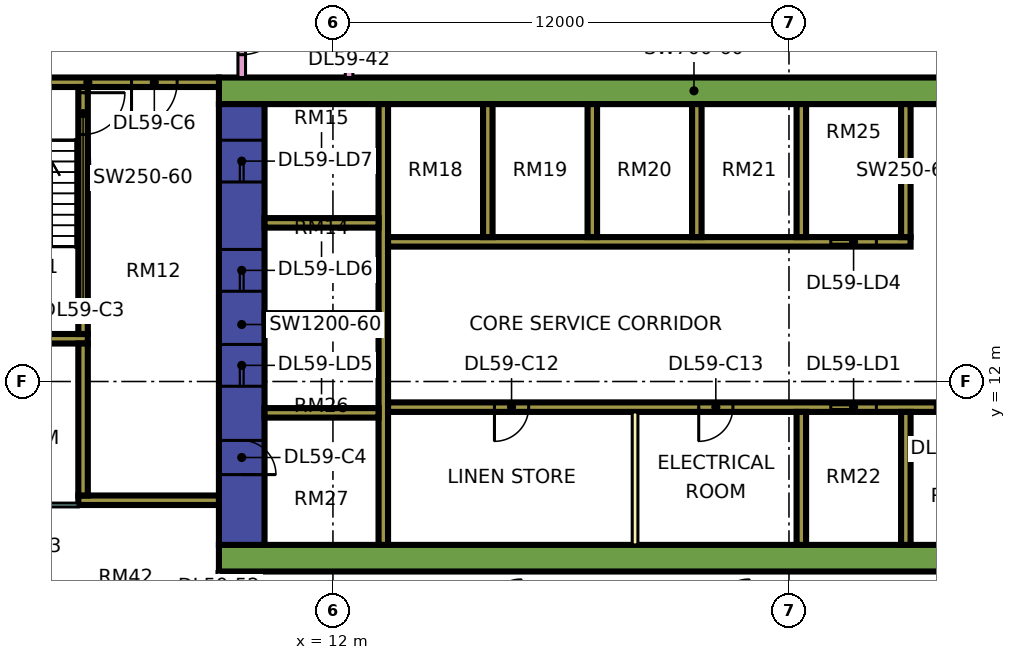
"""IFC4 building model, lengths in metres.
Left out: names, types, materials, properties, quantities, classifications, styles, units other than length and angle.
Written with IfcOpenShell. Run it as: python <this file> out.ifc"""

import sys

from ifc_helpers import new_model, si_unit, direction, frame, frame_2d, origin, place, context, subcontext, project, spatial, rectangle, extrude, element, fill, save


model = new_model("IFC4")
c1 = context("Model", 3, precision=1e-05, world=origin(), true_north=direction((0.0, 1.0)))
c2 = subcontext(c1, "Body", "Model", "MODEL_VIEW")
j1 = project(units=[si_unit("LENGTHUNIT", "METRE"), si_unit("PLANEANGLEUNIT", "RADIAN")], contexts=[c1])
p1 = place(None, origin())
s1 = spatial("IfcSite", under=j1, at=p1, CompositionType="ELEMENT")
p2 = place(p1, origin())
s2 = spatial("IfcBuilding", under=s1, at=p2, CompositionType="ELEMENT")
p3 = place(p2, frame((0.0, 0.0, 249.15)))
s3 = spatial("IfcBuildingStorey", under=s2, at=p3, CompositionType="ELEMENT", Elevation=249.15)
p4 = place(p3, frame((9.0, 7.35, 0.0), z_axis=(0.0, 0.0, 1.0), x_axis=(1.0, 0.0, 0.0)))
e1 = element("IfcWall", 1, at=p4, inside=s3, PredefinedType="SHEAR", context=c2, shape_type="SweptSolid", body=[
    extrude(rectangle(XDim=25.0, YDim=0.7, at=frame_2d((12.5, 0.0))), origin(), (0.0, 0.0, 1.0), 3.75),
])
p5 = place(p3, frame((9.0, 19.65, 0.0), z_axis=(0.0, 0.0, 1.0), x_axis=(1.0, 0.0, 0.0)))
e2 = element("IfcWall", 2, at=p5, inside=s3, PredefinedType="SHEAR", context=c2, shape_type="SweptSolid", body=[
    extrude(rectangle(XDim=25.0, YDim=0.7, at=frame_2d((12.5, 0.0))), origin(), (0.0, 0.0, 1.0), 3.75),
])
p6 = place(p5, frame((19.1, 0.0, 0.0)))
e3 = element("IfcOpeningElement", 3, at=p6, cuts=e2, PredefinedType="OPENING", context=c2, shape_type="SweptSolid", body=[
    extrude(rectangle(XDim=1.8, YDim=2.4, at=frame_2d((0.9, 1.2))), frame((0.0, 0.36, 0.0), z_axis=(0.0, -1.0, 0.0), x_axis=(1.0, 0.0, 0.0)), (0.0, 0.0, 1.0), 0.72),
])
p7 = place(p3, frame((9.6, 7.7, 0.0), z_axis=(0.0, 0.0, 1.0), x_axis=(0.0, 1.0, 0.0)))
e4 = element("IfcWall", 4, at=p7, inside=s3, PredefinedType="SHEAR", context=c2, shape_type="SweptSolid", body=[
    extrude(rectangle(XDim=11.6, YDim=1.2, at=frame_2d((5.8, 0.0))), origin(), (0.0, 0.0, 1.0), 3.75),
])
p8 = place(p7, frame((4.175, 0.0, 0.0)))
e5 = element("IfcOpeningElement", 5, at=p8, cuts=e4, PredefinedType="OPENING", context=c2, shape_type="SweptSolid", body=[
    extrude(rectangle(XDim=1.1, YDim=2.2, at=frame_2d((0.55, 1.1))), frame((0.0, 0.61, 0.0), z_axis=(0.0, -1.0, 0.0), x_axis=(1.0, 0.0, 0.0)), (0.0, 0.0, 1.0), 1.22),
])
p9 = place(p7, frame((6.675, 0.0, 0.0)))
e6 = element("IfcOpeningElement", 6, at=p9, cuts=e4, PredefinedType="OPENING", context=c2, shape_type="SweptSolid", body=[
    extrude(rectangle(XDim=1.1, YDim=2.2, at=frame_2d((0.55, 1.1))), frame((0.0, 0.61, 0.0), z_axis=(0.0, -1.0, 0.0), x_axis=(1.0, 0.0, 0.0)), (0.0, 0.0, 1.0), 1.22),
])
p10 = place(p7, frame((9.55, 0.0, 0.0)))
e7 = element("IfcOpeningElement", 7, at=p10, cuts=e4, PredefinedType="OPENING", context=c2, shape_type="SweptSolid", body=[
    extrude(rectangle(XDim=1.1, YDim=2.2, at=frame_2d((0.55, 1.1))), frame((0.0, 0.61, 0.0), z_axis=(0.0, -1.0, 0.0), x_axis=(1.0, 0.0, 0.0)), (0.0, 0.0, 1.0), 1.22),
])
p11 = place(p7, frame((1.85, 0.0, 0.0)))
e8 = element("IfcOpeningElement", 8, at=p11, cuts=e4, PredefinedType="OPENING", context=c2, shape_type="SweptSolid", body=[
    extrude(rectangle(XDim=0.9, YDim=2.1, at=frame_2d((0.45, 1.05))), frame((0.0, 0.61, 0.0), z_axis=(0.0, -1.0, 0.0), x_axis=(1.0, 0.0, 0.0)), (0.0, 0.0, 1.0), 1.22),
])
p12 = place(p3, frame((13.325, 7.7, 0.0), z_axis=(0.0, 0.0, 1.0), x_axis=(0.0, 1.0, 0.0)))
e9 = element("IfcWall", 9, at=p12, inside=s3, PredefinedType="SHEAR", context=c2, shape_type="SweptSolid", body=[
    extrude(rectangle(XDim=11.6, YDim=0.25, at=frame_2d((5.8, 0.0))), origin(), (0.0, 0.0, 1.0), 3.75),
])
p13 = place(p3, frame((13.45, 11.325, 0.0), z_axis=(0.0, 0.0, 1.0), x_axis=(1.0, 0.0, 0.0)))
e10 = element("IfcWall", 10, at=p13, inside=s3, PredefinedType="SHEAR", context=c2, shape_type="SweptSolid", body=[
    extrude(rectangle(XDim=19.85, YDim=0.25, at=frame_2d((9.925, 0.0))), origin(), (0.0, 0.0, 1.0), 3.75),
])
p14 = place(p13, frame((11.65, 0.0, 0.0)))
e11 = element("IfcOpeningElement", 11, at=p14, cuts=e10, PredefinedType="OPENING", context=c2, shape_type="SweptSolid", body=[
    extrude(rectangle(XDim=1.2, YDim=2.2, at=frame_2d((0.6, 1.1))), frame((0.0, 0.135, 0.0), z_axis=(0.0, -1.0, 0.0), x_axis=(1.0, 0.0, 0.0)), (0.0, 0.0, 1.0), 0.27),
])
p15 = place(p13, frame((14.4, 0.0, 0.0)))
e12 = element("IfcOpeningElement", 12, at=p15, cuts=e10, PredefinedType="OPENING", context=c2, shape_type="SweptSolid", body=[
    extrude(rectangle(XDim=1.2, YDim=2.2, at=frame_2d((0.6, 1.1))), frame((0.0, 0.135, 0.0), z_axis=(0.0, -1.0, 0.0), x_axis=(1.0, 0.0, 0.0)), (0.0, 0.0, 1.0), 0.27),
])
p16 = place(p13, frame((17.15, 0.0, 0.0)))
e13 = element("IfcOpeningElement", 13, at=p16, cuts=e10, PredefinedType="OPENING", context=c2, shape_type="SweptSolid", body=[
    extrude(rectangle(XDim=1.2, YDim=2.2, at=frame_2d((0.6, 1.1))), frame((0.0, 0.135, 0.0), z_axis=(0.0, -1.0, 0.0), x_axis=(1.0, 0.0, 0.0)), (0.0, 0.0, 1.0), 0.27),
])
p17 = place(p13, frame((2.8, 0.0, 0.0)))
e14 = element("IfcOpeningElement", 14, at=p17, cuts=e10, PredefinedType="OPENING", context=c2, shape_type="SweptSolid", body=[
    extrude(rectangle(XDim=0.9, YDim=2.1, at=frame_2d((0.45, 1.05))), frame((0.0, 0.135, 0.0), z_axis=(0.0, -1.0, 0.0), x_axis=(1.0, 0.0, 0.0)), (0.0, 0.0, 1.0), 0.27),
])
p18 = place(p13, frame((8.175, 0.0, 0.0)))
e15 = element("IfcOpeningElement", 15, at=p18, cuts=e10, PredefinedType="OPENING", context=c2, shape_type="SweptSolid", body=[
    extrude(rectangle(XDim=0.9, YDim=2.1, at=frame_2d((0.45, 1.05))), frame((0.0, 0.135, 0.0), z_axis=(0.0, -1.0, 0.0), x_axis=(1.0, 0.0, 0.0)), (0.0, 0.0, 1.0), 0.27),
])
p19 = place(p3, frame((13.45, 15.675, 0.0), z_axis=(0.0, 0.0, 1.0), x_axis=(1.0, 0.0, 0.0)))
e16 = element("IfcWall", 16, at=p19, inside=s3, PredefinedType="SHEAR", context=c2, shape_type="SweptSolid", body=[
    extrude(rectangle(XDim=13.75, YDim=0.25, at=frame_2d((6.875, 0.0))), origin(), (0.0, 0.0, 1.0), 3.75),
])
p20 = place(p19, frame((11.65, 0.0, 0.0)))
e17 = element("IfcOpeningElement", 17, at=p20, cuts=e16, PredefinedType="OPENING", context=c2, shape_type="SweptSolid", body=[
    extrude(rectangle(XDim=1.2, YDim=2.2, at=frame_2d((0.6, 1.1))), frame((0.0, 0.135, 0.0), z_axis=(0.0, -1.0, 0.0), x_axis=(1.0, 0.0, 0.0)), (0.0, 0.0, 1.0), 0.27),
])
for number, where, z_axis, x_axis in (
    (18, (10.2, 11.175, 0.0), (0.0, 0.0, 1.0), (1.0, 0.0, 0.0)),
    (19, (10.2, 13.675, 0.0), (0.0, 0.0, 1.0), (1.0, 0.0, 0.0)),
    (20, (10.2, 16.175, 0.0), (0.0, 0.0, 1.0), (1.0, 0.0, 0.0)),
):
    element("IfcWall", number, at=place(p3, frame(where, z_axis=z_axis, x_axis=x_axis)), inside=s3, PredefinedType="SHEAR", context=c2, shape_type="SweptSolid", body=[
        extrude(rectangle(XDim=3.0, YDim=0.25, at=frame_2d((1.5, 0.0))), origin(), (0.0, 0.0, 1.0), 3.75),
    ])
for number, where, z_axis, x_axis in (
    (21, (24.325, 7.7, 0.0), (0.0, 0.0, 1.0), (0.0, 1.0, 0.0)),
    (22, (27.075, 7.7, 0.0), (0.0, 0.0, 1.0), (0.0, 1.0, 0.0)),
    (23, (16.075, 15.8, 0.0), (0.0, 0.0, 1.0), (0.0, 1.0, 0.0)),
    (24, (18.825, 15.8, 0.0), (0.0, 0.0, 1.0), (0.0, 1.0, 0.0)),
    (25, (21.575, 15.8, 0.0), (0.0, 0.0, 1.0), (0.0, 1.0, 0.0)),
    (26, (24.325, 15.8, 0.0), (0.0, 0.0, 1.0), (0.0, 1.0, 0.0)),
    (27, (27.075, 15.8, 0.0), (0.0, 0.0, 1.0), (0.0, 1.0, 0.0)),
):
    element("IfcWall", number, at=place(p3, frame(where, z_axis=z_axis, x_axis=x_axis)), inside=s3, PredefinedType="SHEAR", context=c2, shape_type="SweptSolid", body=[
        extrude(rectangle(XDim=3.5, YDim=0.25, at=frame_2d((1.75, 0.0))), origin(), (0.0, 0.0, 1.0), 3.75),
    ])
p21 = place(p3, frame((2.1, 19.875, 0.0), z_axis=(0.0, 0.0, 1.0), x_axis=(1.0, 0.0, 0.0)))
e28 = element("IfcWall", 28, at=p21, inside=s3, PredefinedType="SHEAR", context=c2, shape_type="SweptSolid", body=[
    extrude(rectangle(XDim=6.9, YDim=0.25, at=frame_2d((3.45, 0.0))), origin(), (0.0, 0.0, 1.0), 3.75),
])
p22 = place(p21, frame((1.175, 0.0, 0.0)))
e29 = element("IfcOpeningElement", 29, at=p22, cuts=e28, PredefinedType="OPENING", context=c2, shape_type="SweptSolid", body=[
    extrude(rectangle(XDim=1.1, YDim=2.2, at=frame_2d((0.55, 1.1))), frame((0.0, 0.135, 0.0), z_axis=(0.0, -1.0, 0.0), x_axis=(1.0, 0.0, 0.0)), (0.0, 0.0, 1.0), 0.27),
])
p23 = place(p21, frame((4.6, 0.0, 0.0)))
e30 = element("IfcOpeningElement", 30, at=p23, cuts=e28, PredefinedType="OPENING", context=c2, shape_type="SweptSolid", body=[
    extrude(rectangle(XDim=1.2, YDim=2.2, at=frame_2d((0.6, 1.1))), frame((0.0, 0.135, 0.0), z_axis=(0.0, -1.0, 0.0), x_axis=(1.0, 0.0, 0.0)), (0.0, 0.0, 1.0), 0.27),
])
p24 = place(p3, frame((2.1, 13.125, 0.0), z_axis=(0.0, 0.0, 1.0), x_axis=(1.0, 0.0, 0.0)))
e31 = element("IfcWall", 31, at=p24, inside=s3, PredefinedType="SHEAR", context=c2, shape_type="SweptSolid", body=[
    extrude(rectangle(XDim=3.45, YDim=0.25, at=frame_2d((1.725, 0.0))), origin(), (0.0, 0.0, 1.0), 3.75),
])
p25 = place(p3, frame((5.425, 13.25, 0.0), z_axis=(0.0, 0.0, 1.0), x_axis=(0.0, 1.0, 0.0)))
e32 = element("IfcWall", 32, at=p25, inside=s3, PredefinedType="SHEAR", context=c2, shape_type="SweptSolid", body=[
    extrude(rectangle(XDim=6.5, YDim=0.25, at=frame_2d((3.25, 0.0))), origin(), (0.0, 0.0, 1.0), 3.75),
])
p26 = place(p25, frame((5.25, 0.0, 0.0)))
e33 = element("IfcOpeningElement", 33, at=p26, cuts=e32, PredefinedType="OPENING", context=c2, shape_type="SweptSolid", body=[
    extrude(rectangle(XDim=1.1, YDim=2.2, at=frame_2d((0.55, 1.1))), frame((0.0, 0.135, 0.0), z_axis=(0.0, -1.0, 0.0), x_axis=(1.0, 0.0, 0.0)), (0.0, 0.0, 1.0), 0.27),
])
p27 = place(p3, frame((5.3, 8.875, 0.0), z_axis=(0.0, 0.0, 1.0), x_axis=(1.0, 0.0, 0.0)))
e34 = element("IfcWall", 34, at=p27, inside=s3, PredefinedType="SHEAR", context=c2, shape_type="SweptSolid", body=[
    extrude(rectangle(XDim=3.7, YDim=0.25, at=frame_2d((1.85, 0.0))), origin(), (0.0, 0.0, 1.0), 3.75),
])
p28 = place(p3, frame((5.425, 9.0, 0.0), z_axis=(0.0, 0.0, 1.0), x_axis=(0.0, 1.0, 0.0)))
e35 = element("IfcWall", 35, at=p28, inside=s3, PredefinedType="SHEAR", context=c2, shape_type="SweptSolid", body=[
    extrude(rectangle(XDim=4.0, YDim=0.25, at=frame_2d((2.0, 0.0))), origin(), (0.0, 0.0, 1.0), 3.75),
])
p29 = place(p3, frame((-1.447, 12.553, 0.0), z_axis=(0.0, 0.0, 1.0), x_axis=(0.707106781187, -0.707106781187, 0.0)))
e36 = element("IfcWall", 36, at=p29, inside=s3, PredefinedType="SOLIDWALL", context=c2, shape_type="SweptSolid", body=[
    extrude(rectangle(XDim=19.799, YDim=0.15, at=frame_2d((9.899, 0.0))), origin(), (0.0, 0.0, 1.0), 3.35),
])
p30 = place(p29, frame((2.212, 0.0, 0.45)))
e37 = element("IfcOpeningElement", 37, at=p30, cuts=e36, PredefinedType="OPENING", context=c2, shape_type="SweptSolid", body=[
    extrude(rectangle(XDim=3.0, YDim=2.4, at=frame_2d((1.5, 1.2))), frame((0.0, 0.085, 0.0), z_axis=(0.0, -1.0, 0.0), x_axis=(1.0, 0.0, 0.0)), (0.0, 0.0, 1.0), 0.17),
])
p31 = place(p29, frame((10.216, 0.0, 0.45)))
e38 = element("IfcOpeningElement", 38, at=p31, cuts=e36, PredefinedType="OPENING", context=c2, shape_type="SweptSolid", body=[
    extrude(rectangle(XDim=3.0, YDim=2.4, at=frame_2d((1.5, 1.2))), frame((0.0, 0.085, 0.0), z_axis=(0.0, -1.0, 0.0), x_axis=(1.0, 0.0, 0.0)), (0.0, 0.0, 1.0), 0.17),
])
p32 = place(p3, frame((19.95, 7.7, 0.0), z_axis=(0.0, 0.0, 1.0), x_axis=(0.0, 1.0, 0.0)))
e39 = element("IfcWall", 39, at=p32, inside=s3, PredefinedType="PARTITIONING", context=c2, shape_type="SweptSolid", body=[
    extrude(rectangle(XDim=3.5, YDim=0.15, at=frame_2d((1.75, 0.0))), origin(), (0.0, 0.0, 1.0), 3.35),
])
p33 = place(p3, frame((2.461, 8.75, 0.0), z_axis=(0.0, 0.0, 1.0), x_axis=(1.0, 0.0, 0.0)))
e40 = element("IfcWall", 40, at=p33, inside=s3, PredefinedType="PARTITIONING", context=c2, shape_type="SweptSolid", body=[
    extrude(rectangle(XDim=2.839, YDim=0.1, at=frame_2d((1.419, 0.0))), origin(), (0.0, 0.0, 1.0), 3.35),
])
p34 = place(p33, frame((0.889, 0.0, 0.0)))
e41 = element("IfcOpeningElement", 41, at=p34, cuts=e40, PredefinedType="OPENING", context=c2, shape_type="SweptSolid", body=[
    extrude(rectangle(XDim=0.9, YDim=2.1, at=frame_2d((0.45, 1.05))), frame((0.0, 0.06, 0.0), z_axis=(0.0, -1.0, 0.0), x_axis=(1.0, 0.0, 0.0)), (0.0, 0.0, 1.0), 0.12),
])
p35 = place(p3, frame((9.0, 3.95, 0.0), z_axis=(0.0, 0.0, 1.0), x_axis=(0.0, 1.0, 0.0)))
e42 = element("IfcWall", 42, at=p35, inside=s3, PredefinedType="PARTITIONING", context=c2, shape_type="SweptSolid", body=[
    extrude(rectangle(XDim=3.05, YDim=0.1, at=frame_2d((1.525, 0.0))), origin(), (0.0, 0.0, 1.0), 3.35),
])
p36 = place(p35, frame((1.1, 0.0, 0.0)))
e43 = element("IfcOpeningElement", 43, at=p36, cuts=e42, PredefinedType="OPENING", context=c2, shape_type="SweptSolid", body=[
    extrude(rectangle(XDim=0.9, YDim=2.1, at=frame_2d((0.45, 1.05))), frame((0.0, 0.06, 0.0), z_axis=(0.0, -1.0, 0.0), x_axis=(1.0, 0.0, 0.0)), (0.0, 0.0, 1.0), 0.12),
])
p37 = place(p3, frame((9.6, 20.0, 0.0), z_axis=(0.0, 0.0, 1.0), x_axis=(0.0, 1.0, 0.0)))
e44 = element("IfcWall", 44, at=p37, inside=s3, PredefinedType="PARTITIONING", context=c2, shape_type="SweptSolid", body=[
    extrude(rectangle(XDim=44.35, YDim=0.2, at=frame_2d((22.175, 0.0))), origin(), (0.0, 0.0, 1.0), 3.35),
])
p38 = place(p37, frame((28.8, 0.0, 0.0)))
e45 = element("IfcOpeningElement", 45, at=p38, cuts=e44, PredefinedType="OPENING", context=c2, shape_type="SweptSolid", body=[
    extrude(rectangle(XDim=1.0, YDim=2.1, at=frame_2d((0.5, 1.05))), frame((0.0, 0.11, 0.0), z_axis=(0.0, -1.0, 0.0), x_axis=(1.0, 0.0, 0.0)), (0.0, 0.0, 1.0), 0.22),
])
p39 = place(p37, frame((0.6, 0.0, 0.0)))
e46 = element("IfcOpeningElement", 46, at=p39, cuts=e44, PredefinedType="OPENING", context=c2, shape_type="SweptSolid", body=[
    extrude(rectangle(XDim=1.2, YDim=2.1, at=frame_2d((0.6, 1.05))), frame((0.0, 0.11, 0.0), z_axis=(0.0, -1.0, 0.0), x_axis=(1.0, 0.0, 0.0)), (0.0, 0.0, 1.0), 0.22),
])
p40 = place(p37, frame((3.9, 0.0, 0.0)))
e47 = element("IfcOpeningElement", 47, at=p40, cuts=e44, PredefinedType="OPENING", context=c2, shape_type="SweptSolid", body=[
    extrude(rectangle(XDim=1.0, YDim=2.1, at=frame_2d((0.5, 1.05))), frame((0.0, 0.11, 0.0), z_axis=(0.0, -1.0, 0.0), x_axis=(1.0, 0.0, 0.0)), (0.0, 0.0, 1.0), 0.22),
])
p41 = place(p3, frame((12.425, 20.0, 0.0), z_axis=(0.0, 0.0, 1.0), x_axis=(0.0, 1.0, 0.0)))
e48 = element("IfcWall", 48, at=p41, inside=s3, PredefinedType="PARTITIONING", context=c2, shape_type="SweptSolid", body=[
    extrude(rectangle(XDim=42.926, YDim=0.2, at=frame_2d((21.463, 0.0))), origin(), (0.0, 0.0, 1.0), 3.35),
])
p42 = place(p41, frame((7.0, 0.0, 0.0)))
e49 = element("IfcOpeningElement", 49, at=p42, cuts=e48, PredefinedType="OPENING", context=c2, shape_type="SweptSolid", body=[
    extrude(rectangle(XDim=1.0, YDim=2.1, at=frame_2d((0.5, 1.05))), frame((0.0, 0.11, 0.0), z_axis=(0.0, -1.0, 0.0), x_axis=(1.0, 0.0, 0.0)), (0.0, 0.0, 1.0), 0.22),
])
p43 = place(p41, frame((12.95, 0.0, 0.0)))
e50 = element("IfcOpeningElement", 50, at=p43, cuts=e48, PredefinedType="OPENING", context=c2, shape_type="SweptSolid", body=[
    extrude(rectangle(XDim=1.0, YDim=2.1, at=frame_2d((0.5, 1.05))), frame((0.0, 0.11, 0.0), z_axis=(0.0, -1.0, 0.0), x_axis=(1.0, 0.0, 0.0)), (0.0, 0.0, 1.0), 0.22),
])
p44 = place(p41, frame((16.75, 0.0, 0.0)))
e51 = element("IfcOpeningElement", 51, at=p44, cuts=e48, PredefinedType="OPENING", context=c2, shape_type="SweptSolid", body=[
    extrude(rectangle(XDim=1.0, YDim=2.1, at=frame_2d((0.5, 1.05))), frame((0.0, 0.11, 0.0), z_axis=(0.0, -1.0, 0.0), x_axis=(1.0, 0.0, 0.0)), (0.0, 0.0, 1.0), 0.22),
])
p45 = place(p41, frame((34.9, 0.0, 0.0)))
e52 = element("IfcOpeningElement", 52, at=p45, cuts=e48, PredefinedType="OPENING", context=c2, shape_type="SweptSolid", body=[
    extrude(rectangle(XDim=1.0, YDim=2.1, at=frame_2d((0.5, 1.05))), frame((0.0, 0.11, 0.0), z_axis=(0.0, -1.0, 0.0), x_axis=(1.0, 0.0, 0.0)), (0.0, 0.0, 1.0), 0.22),
])
p46 = place(p41, frame((1.15, 0.0, 0.0)))
e53 = element("IfcOpeningElement", 53, at=p46, cuts=e48, PredefinedType="OPENING", context=c2, shape_type="SweptSolid", body=[
    extrude(rectangle(XDim=1.8, YDim=2.1, at=frame_2d((0.9, 1.05))), frame((0.0, 0.11, 0.0), z_axis=(0.0, -1.0, 0.0), x_axis=(1.0, 0.0, 0.0)), (0.0, 0.0, 1.0), 0.22),
])
p47 = place(p41, frame((28.6, 0.0, 0.0)))
e54 = element("IfcOpeningElement", 54, at=p47, cuts=e48, PredefinedType="OPENING", context=c2, shape_type="SweptSolid", body=[
    extrude(rectangle(XDim=1.8, YDim=2.1, at=frame_2d((0.9, 1.05))), frame((0.0, 0.11, 0.0), z_axis=(0.0, -1.0, 0.0), x_axis=(1.0, 0.0, 0.0)), (0.0, 0.0, 1.0), 0.22),
])
p48 = place(p14, origin())
e55 = element("IfcDoor", 55, at=p48, inside=s3, OperationType="DOUBLE_DOOR_SLIDING", PredefinedType="DOOR", context=c2, shape_type="SweptSolid", body=[
    extrude(rectangle(XDim=1.2, YDim=2.2, at=frame_2d((0.6, 1.1))), frame((0.0, 0.025, 0.0), z_axis=(0.0, -1.0, 0.0), x_axis=(1.0, 0.0, 0.0)), (0.0, 0.0, 1.0), 0.05),
])
fill(e11, e55)
p49 = place(p15, origin())
e56 = element("IfcDoor", 56, at=p49, inside=s3, OperationType="DOUBLE_DOOR_SLIDING", PredefinedType="DOOR", context=c2, shape_type="SweptSolid", body=[
    extrude(rectangle(XDim=1.2, YDim=2.2, at=frame_2d((0.6, 1.1))), frame((0.0, 0.025, 0.0), z_axis=(0.0, -1.0, 0.0), x_axis=(1.0, 0.0, 0.0)), (0.0, 0.0, 1.0), 0.05),
])
fill(e12, e56)
p50 = place(p20, origin())
e57 = element("IfcDoor", 57, at=p50, inside=s3, OperationType="DOUBLE_DOOR_SLIDING", PredefinedType="DOOR", context=c2, shape_type="SweptSolid", body=[
    extrude(rectangle(XDim=1.2, YDim=2.2, at=frame_2d((0.6, 1.1))), frame((0.0, 0.025, 0.0), z_axis=(0.0, -1.0, 0.0), x_axis=(1.0, 0.0, 0.0)), (0.0, 0.0, 1.0), 0.05),
])
fill(e17, e57)
p51 = place(p8, origin())
e58 = element("IfcDoor", 58, at=p51, inside=s3, OperationType="DOUBLE_DOOR_SLIDING", PredefinedType="DOOR", context=c2, shape_type="SweptSolid", body=[
    extrude(rectangle(XDim=1.1, YDim=2.2, at=frame_2d((0.55, 1.1))), frame((0.0, 0.025, 0.0), z_axis=(0.0, -1.0, 0.0), x_axis=(1.0, 0.0, 0.0)), (0.0, 0.0, 1.0), 0.05),
])
fill(e5, e58)
p52 = place(p9, origin())
e59 = element("IfcDoor", 59, at=p52, inside=s3, OperationType="DOUBLE_DOOR_SLIDING", PredefinedType="DOOR", context=c2, shape_type="SweptSolid", body=[
    extrude(rectangle(XDim=1.1, YDim=2.2, at=frame_2d((0.55, 1.1))), frame((0.0, 0.025, 0.0), z_axis=(0.0, -1.0, 0.0), x_axis=(1.0, 0.0, 0.0)), (0.0, 0.0, 1.0), 0.05),
])
fill(e6, e59)
p53 = place(p10, origin())
e60 = element("IfcDoor", 60, at=p53, inside=s3, OperationType="DOUBLE_DOOR_SLIDING", PredefinedType="DOOR", context=c2, shape_type="SweptSolid", body=[
    extrude(rectangle(XDim=1.1, YDim=2.2, at=frame_2d((0.55, 1.1))), frame((0.0, 0.025, 0.0), z_axis=(0.0, -1.0, 0.0), x_axis=(1.0, 0.0, 0.0)), (0.0, 0.0, 1.0), 0.05),
])
fill(e7, e60)
p54 = place(p26, origin())
e61 = element("IfcDoor", 61, at=p54, inside=s3, OperationType="SINGLE_SWING_RIGHT", PredefinedType="DOOR", context=c2, shape_type="SweptSolid", body=[
    extrude(rectangle(XDim=1.1, YDim=2.2, at=frame_2d((0.55, 1.1))), frame((0.0, 0.025, 0.0), z_axis=(0.0, -1.0, 0.0), x_axis=(1.0, 0.0, 0.0)), (0.0, 0.0, 1.0), 0.05),
])
fill(e33, e61)
p55 = place(p11, frame((0.9, 0.0, 0.0), z_axis=(0.0, 0.0, 1.0), x_axis=(-1.0, 0.0, 0.0)))
e62 = element("IfcDoor", 62, at=p55, inside=s3, OperationType="SINGLE_SWING_LEFT", PredefinedType="DOOR", context=c2, shape_type="SweptSolid", body=[
    extrude(rectangle(XDim=0.9, YDim=2.1, at=frame_2d((0.45, 1.05))), frame((0.0, 0.025, 0.0), z_axis=(0.0, -1.0, 0.0), x_axis=(1.0, 0.0, 0.0)), (0.0, 0.0, 1.0), 0.05),
])
fill(e8, e62)
p56 = place(p23, frame((1.2, 0.0, 0.0), z_axis=(0.0, 0.0, 1.0), x_axis=(-1.0, 0.0, 0.0)))
e63 = element("IfcDoor", 63, at=p56, inside=s3, OperationType="SINGLE_SWING_LEFT", PredefinedType="DOOR", context=c2, shape_type="SweptSolid", body=[
    extrude(rectangle(XDim=1.2, YDim=2.2, at=frame_2d((0.6, 1.1))), frame((0.0, 0.025, 0.0), z_axis=(0.0, -1.0, 0.0), x_axis=(1.0, 0.0, 0.0)), (0.0, 0.0, 1.0), 0.05),
])
fill(e30, e63)
p57 = place(p17, frame((0.9, 0.0, 0.0), z_axis=(0.0, 0.0, 1.0), x_axis=(-1.0, 0.0, 0.0)))
e64 = element("IfcDoor", 64, at=p57, inside=s3, OperationType="SINGLE_SWING_LEFT", PredefinedType="DOOR", context=c2, shape_type="SweptSolid", body=[
    extrude(rectangle(XDim=0.9, YDim=2.1, at=frame_2d((0.45, 1.05))), frame((0.0, 0.025, 0.0), z_axis=(0.0, -1.0, 0.0), x_axis=(1.0, 0.0, 0.0)), (0.0, 0.0, 1.0), 0.05),
])
fill(e14, e64)
p58 = place(p18, frame((0.9, 0.0, 0.0), z_axis=(0.0, 0.0, 1.0), x_axis=(-1.0, 0.0, 0.0)))
e65 = element("IfcDoor", 65, at=p58, inside=s3, OperationType="SINGLE_SWING_LEFT", PredefinedType="DOOR", context=c2, shape_type="SweptSolid", body=[
    extrude(rectangle(XDim=0.9, YDim=2.1, at=frame_2d((0.45, 1.05))), frame((0.0, 0.025, 0.0), z_axis=(0.0, -1.0, 0.0), x_axis=(1.0, 0.0, 0.0)), (0.0, 0.0, 1.0), 0.05),
])
fill(e15, e65)
p59 = place(p39, origin())
e66 = element("IfcDoor", 66, at=p59, inside=s3, OperationType="SINGLE_SWING_RIGHT", PredefinedType="DOOR", context=c2, shape_type="SweptSolid", body=[
    extrude(rectangle(XDim=1.2, YDim=2.1, at=frame_2d((0.6, 1.05))), frame((0.0, 0.025, 0.0), z_axis=(0.0, -1.0, 0.0), x_axis=(1.0, 0.0, 0.0)), (0.0, 0.0, 1.0), 0.05),
])
fill(e46, e66)
save(model, sys.argv[1])
